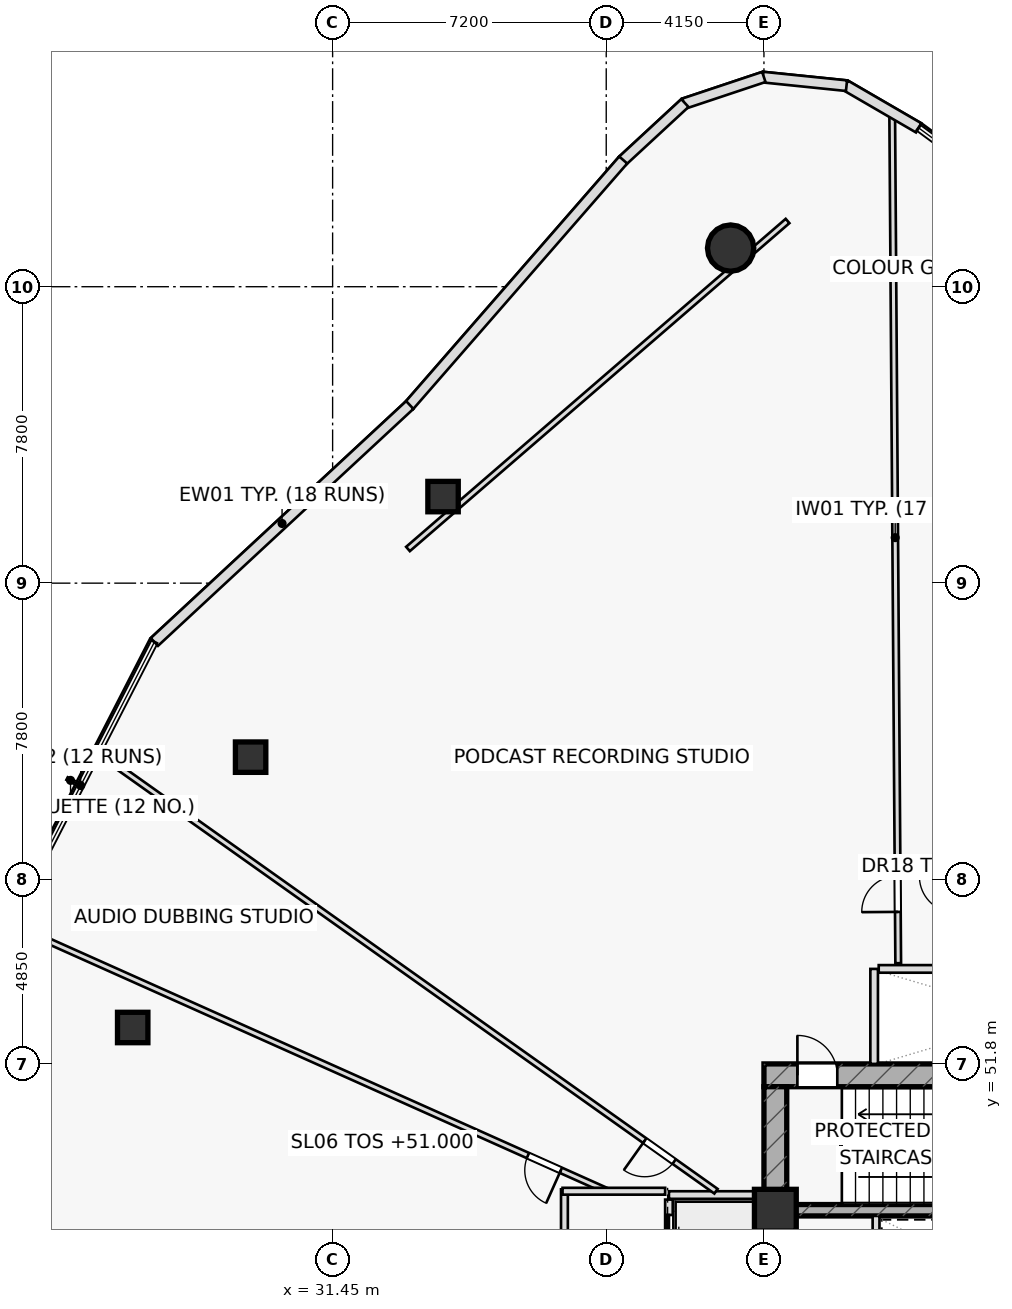
"""IFC4 building model, lengths in metres.
Left out: names, types, materials, properties, quantities, classifications, styles, units other than length and angle.
Written with IfcOpenShell. Run it as: python <this file> out.ifc"""

import sys

from ifc_helpers import new_model, si_unit, direction, frame, frame_2d, origin, origin_2d, place, context, subcontext, project, spatial, rectangle, hollow_rectangle, hollow_circle, extrude, element, fill, save


model = new_model("IFC4")
c1 = context("Model", 3, precision=1e-05, world=origin(), true_north=direction((0.0, 1.0)))
c2 = subcontext(c1, "Body", "Model", "MODEL_VIEW")
j1 = project(units=[si_unit("LENGTHUNIT", "METRE"), si_unit("PLANEANGLEUNIT", "RADIAN")], contexts=[c1])
p1 = place(None, origin())
s1 = spatial("IfcSite", under=j1, at=p1, CompositionType="ELEMENT")
p2 = place(p1, origin())
s2 = spatial("IfcBuilding", under=s1, at=p2, CompositionType="ELEMENT")
p3 = place(p2, frame((0.0, 0.0, 51.0)))
s3 = spatial("IfcBuildingStorey", under=s2, at=p3, CompositionType="ELEMENT", Elevation=51.0)
p4 = place(p3, frame((42.8, 51.5, 0.0), z_axis=(0.0, 0.0, 1.0), x_axis=(1.0, 0.0, 0.0)))
e1 = element("IfcWall", 1, at=p4, inside=s3, PredefinedType="SHEAR", context=c2, shape_type="SweptSolid", body=[
    extrude(rectangle(XDim=14.4, YDim=0.6, at=frame_2d((7.2, 0.0))), origin(), (0.0, 0.0, 1.0), 3.6),
])
p5 = place(p4, frame((0.88, 0.0, 0.0)))
e2 = element("IfcOpeningElement", 2, at=p5, cuts=e1, PredefinedType="OPENING", context=c2, shape_type="SweptSolid", body=[
    extrude(rectangle(XDim=1.05, YDim=2.2, at=frame_2d((0.525, 1.1))), frame((0.0, 0.31, 0.0), z_axis=(0.0, -1.0, 0.0), x_axis=(1.0, 0.0, 0.0)), (0.0, 0.0, 1.0), 0.62),
])
p6 = place(p3, frame((43.1, 38.8, 0.0), z_axis=(0.0, 0.0, 1.0), x_axis=(0.0, 1.0, 0.0)))
e3 = element("IfcWall", 3, at=p6, inside=s3, PredefinedType="SHEAR", context=c2, shape_type="SweptSolid", body=[
    extrude(rectangle(XDim=12.4, YDim=0.6, at=frame_2d((6.2, 0.0))), origin(), (0.0, 0.0, 1.0), 3.6),
])
p7 = place(p3, frame((43.4, 47.95, 0.0), z_axis=(0.0, 0.0, 1.0), x_axis=(1.0, 0.0, 0.0)))
e4 = element("IfcWall", 4, at=p7, inside=s3, PredefinedType="SHEAR", context=c2, shape_type="SweptSolid", body=[
    extrude(rectangle(XDim=13.2, YDim=0.3, at=frame_2d((6.6, 0.0))), origin(), (0.0, 0.0, 1.0), 3.6),
])
p8 = place(p7, frame((8.345, 0.0, 0.0)))
e5 = element("IfcOpeningElement", 5, at=p8, cuts=e4, PredefinedType="OPENING", context=c2, shape_type="SweptSolid", body=[
    extrude(rectangle(XDim=1.15, YDim=2.2, at=frame_2d((0.575, 1.1))), frame((0.0, 0.16, 0.0), z_axis=(0.0, -1.0, 0.0), x_axis=(1.0, 0.0, 0.0)), (0.0, 0.0, 1.0), 0.32),
])
p9 = place(p7, frame((10.065, 0.0, 0.0)))
e6 = element("IfcOpeningElement", 6, at=p9, cuts=e4, PredefinedType="OPENING", context=c2, shape_type="SweptSolid", body=[
    extrude(rectangle(XDim=1.15, YDim=2.2, at=frame_2d((0.575, 1.1))), frame((0.0, 0.16, 0.0), z_axis=(0.0, -1.0, 0.0), x_axis=(1.0, 0.0, 0.0)), (0.0, 0.0, 1.0), 0.32),
])
p10 = place(p7, frame((11.645, 0.0, 0.0)))
e7 = element("IfcOpeningElement", 7, at=p10, cuts=e4, PredefinedType="OPENING", context=c2, shape_type="SweptSolid", body=[
    extrude(rectangle(XDim=1.15, YDim=2.2, at=frame_2d((0.575, 1.1))), frame((0.0, 0.16, 0.0), z_axis=(0.0, -1.0, 0.0), x_axis=(1.0, 0.0, 0.0)), (0.0, 0.0, 1.0), 0.32),
])
p11 = place(p3, frame((43.1, 47.95, 0.0), z_axis=(0.0, 0.0, 1.0), x_axis=(1.0, 0.0, 0.0)))
e8 = element("IfcColumn", 8, at=p11, inside=s3, PredefinedType="COLUMN", context=c2, shape_type="SweptSolid", body=[
    extrude(rectangle(XDim=1.1, YDim=1.1, at=origin_2d()), origin(), (0.0, 0.0, 1.0), 3.6),
])
p12 = place(p3, frame((41.923, 73.266, 0.0), z_axis=(0.0, 0.0, 1.0), x_axis=(1.0, 0.0, 0.0)))
e9 = element("IfcColumn", 9, at=p12, inside=s3, PredefinedType="COLUMN", context=c2, shape_type="SweptSolid", body=[
    extrude(hollow_circle(Radius=0.61, WallThickness=0.05, at=origin_2d()), origin(), (0.0, 0.0, 1.0), 3.6),
])
for number, where, z_axis, x_axis in (
    (10, (34.356, 66.728, 0.0), (0.0, 0.0, 1.0), (1.0, 0.0, 0.0)),
    (11, (29.292, 59.872, 0.0), (0.0, 0.0, 1.0), (1.0, 0.0, 0.0)),
    (12, (26.189, 52.758, 0.0), (0.0, 0.0, 1.0), (1.0, 0.0, 0.0)),
):
    element("IfcColumn", number, at=place(p3, frame(where, z_axis=z_axis, x_axis=x_axis)), inside=s3, PredefinedType="COLUMN", context=c2, shape_type="SweptSolid", body=[
        extrude(hollow_rectangle(XDim=0.8, YDim=0.8, WallThickness=0.045, at=origin_2d()), origin(), (0.0, 0.0, 1.0), 3.6),
    ])
for number, where, z_axis, x_axis in (
    (13, (40.3, 48.35, 0.0), (0.0, 0.0, 1.0), (1.0, 0.0, 0.0)),
    (14, (45.7, 51.8, 0.0), (0.0, 0.0, 1.0), (0.0, 1.0, 0.0)),
):
    element("IfcWall", number, at=place(p3, frame(where, z_axis=z_axis, x_axis=x_axis)), inside=s3, PredefinedType="PARTITIONING", context=c2, shape_type="SweptSolid", body=[
        extrude(rectangle(XDim=2.5, YDim=0.2, at=frame_2d((1.25, 0.0))), origin(), (0.0, 0.0, 1.0), 3.6),
    ])
p13 = place(p3, frame((45.75, 42.2, 0.0), z_axis=(0.0, 0.0, 1.0), x_axis=(0.0, 1.0, 0.0)))
e15 = element("IfcWall", 15, at=p13, inside=s3, PredefinedType="PARTITIONING", context=c2, shape_type="SweptSolid", body=[
    extrude(rectangle(XDim=5.6, YDim=0.18, at=frame_2d((2.8, 0.0))), origin(), (0.0, 0.0, 1.0), 3.6),
])
p14 = place(p13, frame((0.55, 0.0, 0.0)))
e16 = element("IfcOpeningElement", 16, at=p14, cuts=e15, PredefinedType="OPENING", context=c2, shape_type="SweptSolid", body=[
    extrude(rectangle(XDim=0.9, YDim=2.05, at=frame_2d((0.45, 1.025))), frame((0.0, 0.1, 0.0), z_axis=(0.0, -1.0, 0.0), x_axis=(1.0, 0.0, 0.0)), (0.0, 0.0, 1.0), 0.2),
])
p15 = place(p13, frame((2.9, 0.0, 0.0)))
e17 = element("IfcOpeningElement", 17, at=p15, cuts=e15, PredefinedType="OPENING", context=c2, shape_type="SweptSolid", body=[
    extrude(rectangle(XDim=0.85, YDim=2.05, at=frame_2d((0.425, 1.025))), frame((0.0, 0.1, 0.0), z_axis=(0.0, -1.0, 0.0), x_axis=(1.0, 0.0, 0.0)), (0.0, 0.0, 1.0), 0.2),
])
p16 = place(p3, frame((43.421, 73.979, 0.0), z_axis=(0.0, 0.0, 1.0), x_axis=(-0.756659135409, -0.653809569218, 0.0)))
e18 = element("IfcWall", 18, at=p16, inside=s3, PredefinedType="PARTITIONING", context=c2, shape_type="SweptSolid", body=[
    extrude(rectangle(XDim=13.2, YDim=0.15, at=frame_2d((6.6, 0.0))), origin(), (0.0, 0.0, 1.0), 2.925),
])
p17 = place(p3, frame((46.333, 54.45, 0.0), z_axis=(0.0, 0.0, 1.0), x_axis=(-0.007063802918, 0.999975051033, 0.0)))
e19 = element("IfcWall", 19, at=p17, inside=s3, PredefinedType="PARTITIONING", context=c2, shape_type="SweptSolid", body=[
    extrude(rectangle(XDim=22.396, YDim=0.15, at=frame_2d((11.198, 0.0))), origin(), (0.0, 0.0, 1.0), 2.975),
])
p18 = place(p17, frame((1.35, 0.0, 0.0)))
e20 = element("IfcOpeningElement", 20, at=p18, cuts=e19, PredefinedType="OPENING", context=c2, shape_type="SweptSolid", body=[
    extrude(rectangle(XDim=0.95, YDim=2.05, at=frame_2d((0.475, 1.025))), frame((0.0, 0.085, 0.0), z_axis=(0.0, -1.0, 0.0), x_axis=(1.0, 0.0, 0.0)), (0.0, 0.0, 1.0), 0.17),
])
p19 = place(p3, frame((41.539, 48.45, 0.0), z_axis=(0.0, 0.0, 1.0), x_axis=(-0.81551552438, 0.578735198079, 0.0)))
e21 = element("IfcWall", 21, at=p19, inside=s3, PredefinedType="PARTITIONING", context=c2, shape_type="SweptSolid", body=[
    extrude(rectangle(XDim=19.961, YDim=0.15, at=frame_2d((9.98, 0.0))), origin(), (0.0, 0.0, 1.0), 2.925),
])
p20 = place(p19, frame((1.35, 0.0, 0.0)))
e22 = element("IfcOpeningElement", 22, at=p20, cuts=e21, PredefinedType="OPENING", context=c2, shape_type="SweptSolid", body=[
    extrude(rectangle(XDim=0.95, YDim=2.05, at=frame_2d((0.475, 1.025))), frame((0.0, 0.085, 0.0), z_axis=(0.0, -1.0, 0.0), x_axis=(1.0, 0.0, 0.0)), (0.0, 0.0, 1.0), 0.17),
])
p21 = place(p3, frame((38.688, 48.45, 0.0), z_axis=(0.0, 0.0, 1.0), x_axis=(-0.912816446659, 0.408370095269, 0.0)))
e23 = element("IfcWall", 23, at=p21, inside=s3, PredefinedType="PARTITIONING", context=c2, shape_type="SweptSolid", body=[
    extrude(rectangle(XDim=17.247, YDim=0.15, at=frame_2d((8.623, 0.0))), origin(), (0.0, 0.0, 1.0), 2.925),
])
p22 = place(p21, frame((1.35, 0.0, 0.0)))
e24 = element("IfcOpeningElement", 24, at=p22, cuts=e23, PredefinedType="OPENING", context=c2, shape_type="SweptSolid", body=[
    extrude(rectangle(XDim=0.95, YDim=2.05, at=frame_2d((0.475, 1.025))), frame((0.0, 0.085, 0.0), z_axis=(0.0, -1.0, 0.0), x_axis=(1.0, 0.0, 0.0)), (0.0, 0.0, 1.0), 0.17),
])
p23 = place(p3, frame((37.55, 35.75, 0.0), z_axis=(0.0, 0.0, 1.0), x_axis=(0.0, 1.0, 0.0)))
e25 = element("IfcWall", 25, at=p23, inside=s3, PredefinedType="PARTITIONING", context=c2, shape_type="SweptSolid", body=[
    extrude(rectangle(XDim=12.75, YDim=0.18, at=frame_2d((6.375, 0.0))), origin(), (0.0, 0.0, 1.0), 2.925),
])
p24 = place(p23, frame((2.4, 0.0, 0.0)))
e26 = element("IfcOpeningElement", 26, at=p24, cuts=e25, PredefinedType="OPENING", context=c2, shape_type="SweptSolid", body=[
    extrude(rectangle(XDim=0.95, YDim=2.05, at=frame_2d((0.475, 1.025))), frame((0.0, 0.1, 0.0), z_axis=(0.0, -1.0, 0.0), x_axis=(1.0, 0.0, 0.0)), (0.0, 0.0, 1.0), 0.2),
])
p25 = place(p23, frame((8.547, 0.0, 0.0)))
e27 = element("IfcOpeningElement", 27, at=p25, cuts=e25, PredefinedType="OPENING", context=c2, shape_type="SweptSolid", body=[
    extrude(rectangle(XDim=0.95, YDim=2.05, at=frame_2d((0.475, 1.025))), frame((0.0, 0.1, 0.0), z_axis=(0.0, -1.0, 0.0), x_axis=(1.0, 0.0, 0.0)), (0.0, 0.0, 1.0), 0.2),
])
p26 = place(p3, frame((37.5, 48.45, 0.0), z_axis=(0.0, 0.0, 1.0), x_axis=(1.0, 0.0, 0.0)))
e28 = element("IfcWall", 28, at=p26, inside=s3, PredefinedType="PARTITIONING", context=c2, shape_type="SweptSolid", body=[
    extrude(rectangle(XDim=2.7, YDim=0.18, at=frame_2d((1.35, 0.0))), origin(), (0.0, 0.0, 1.0), 3.6),
])
p27 = place(p3, frame((46.871, 76.43, 0.0), z_axis=(0.0, 0.0, 1.0), x_axis=(-0.86470757028, 0.502275639366, 0.0)))
e29 = element("IfcWall", 29, at=p27, inside=s3, PredefinedType="STANDARD", context=c2, shape_type="SweptSolid", body=[
    extrude(rectangle(XDim=2.228, YDim=0.28, at=frame_2d((1.114, 0.0))), origin(), (0.0, 0.0, 1.0), 3.6),
])
p28 = place(p3, frame((44.972, 77.54, 0.0), z_axis=(0.0, 0.0, 1.0), x_axis=(-0.994794332276, 0.101903073904, 0.0)))
e30 = element("IfcWall", 30, at=p28, inside=s3, PredefinedType="STANDARD", context=c2, shape_type="SweptSolid", body=[
    extrude(rectangle(XDim=2.216, YDim=0.28, at=frame_2d((1.108, 0.0))), origin(), (0.0, 0.0, 1.0), 3.6),
])
p29 = place(p3, frame((42.797, 77.769, 0.0), z_axis=(0.0, 0.0, 1.0), x_axis=(-0.948595132525, -0.316492139791, 0.0)))
e31 = element("IfcWall", 31, at=p29, inside=s3, PredefinedType="STANDARD", context=c2, shape_type="SweptSolid", body=[
    extrude(rectangle(XDim=2.216, YDim=0.28, at=frame_2d((1.108, 0.0))), origin(), (0.0, 0.0, 1.0), 3.6),
])
p30 = place(p3, frame((40.72, 77.082, 0.0), z_axis=(0.0, 0.0, 1.0), x_axis=(-0.734368471989, -0.678751020145, 0.0)))
e32 = element("IfcWall", 32, at=p30, inside=s3, PredefinedType="STANDARD", context=c2, shape_type="SweptSolid", body=[
    extrude(rectangle(XDim=2.239, YDim=0.28, at=frame_2d((1.119, 0.0))), origin(), (0.0, 0.0, 1.0), 3.6),
])
p31 = place(p3, frame((39.097, 75.584, 0.0), z_axis=(0.0, 0.0, 1.0), x_axis=(-0.657063068244, -0.753835608306, 0.0)))
e33 = element("IfcWall", 33, at=p31, inside=s3, PredefinedType="STANDARD", context=c2, shape_type="SweptSolid", body=[
    extrude(rectangle(XDim=8.58, YDim=0.28, at=frame_2d((4.29, 0.0))), origin(), (0.0, 0.0, 1.0), 3.6),
])
p32 = place(p3, frame((33.48, 69.138, 0.0), z_axis=(0.0, 0.0, 1.0), x_axis=(-0.733106400335, -0.680113965294, 0.0)))
e34 = element("IfcWall", 34, at=p32, inside=s3, PredefinedType="STANDARD", context=c2, shape_type="SweptSolid", body=[
    extrude(rectangle(XDim=9.168, YDim=0.28, at=frame_2d((4.584, 0.0))), origin(), (0.0, 0.0, 1.0), 3.6),
])
p33 = place(p3, frame((40.3, 40.02, 0.0), z_axis=(0.0, 0.0, 1.0), x_axis=(0.0, 1.0, 0.0)))
e35 = element("IfcWall", 35, at=p33, inside=s3, PredefinedType="PARTITIONING", context=c2, shape_type="SweptSolid", body=[
    extrude(rectangle(XDim=8.21, YDim=0.2, at=frame_2d((4.105, 0.0))), origin(), (0.0, 0.0, 1.0), 3.6),
])
p34 = place(p33, frame((0.405, 0.0, 0.0)))
e36 = element("IfcOpeningElement", 36, at=p34, cuts=e35, PredefinedType="OPENING", context=c2, shape_type="SweptSolid", body=[
    extrude(rectangle(XDim=1.1, YDim=2.15, at=frame_2d((0.55, 1.075))), frame((0.0, 0.11, 0.0), z_axis=(0.0, -1.0, 0.0), x_axis=(1.0, 0.0, 0.0)), (0.0, 0.0, 1.0), 0.22),
])
p35 = place(p33, frame((2.505, 0.0, 0.0)))
e37 = element("IfcOpeningElement", 37, at=p35, cuts=e35, PredefinedType="OPENING", context=c2, shape_type="SweptSolid", body=[
    extrude(rectangle(XDim=1.1, YDim=2.15, at=frame_2d((0.55, 1.075))), frame((0.0, 0.11, 0.0), z_axis=(0.0, -1.0, 0.0), x_axis=(1.0, 0.0, 0.0)), (0.0, 0.0, 1.0), 0.22),
])
p36 = place(p33, frame((4.605, 0.0, 0.0)))
e38 = element("IfcOpeningElement", 38, at=p36, cuts=e35, PredefinedType="OPENING", context=c2, shape_type="SweptSolid", body=[
    extrude(rectangle(XDim=1.1, YDim=2.15, at=frame_2d((0.55, 1.075))), frame((0.0, 0.11, 0.0), z_axis=(0.0, -1.0, 0.0), x_axis=(1.0, 0.0, 0.0)), (0.0, 0.0, 1.0), 0.22),
])
p37 = place(p33, frame((6.705, 0.0, 0.0)))
e39 = element("IfcOpeningElement", 39, at=p37, cuts=e35, PredefinedType="OPENING", context=c2, shape_type="SweptSolid", body=[
    extrude(rectangle(XDim=1.1, YDim=2.15, at=frame_2d((0.55, 1.075))), frame((0.0, 0.11, 0.0), z_axis=(0.0, -1.0, 0.0), x_axis=(1.0, 0.0, 0.0)), (0.0, 0.0, 1.0), 0.22),
])
p38 = place(p3, frame((45.82, 54.3, 0.0), z_axis=(0.0, 0.0, 1.0), x_axis=(1.0, 0.0, 0.0)))
e40 = element("IfcWall", 40, at=p38, inside=s3, PredefinedType="PARTITIONING", context=c2, shape_type="SweptSolid", body=[
    extrude(rectangle(XDim=8.31, YDim=0.2, at=frame_2d((4.155, 0.0))), origin(), (0.0, 0.0, 1.0), 3.6),
])
p39 = place(p5, origin())
e41 = element("IfcDoor", 41, at=p39, inside=s3, OperationType="SINGLE_SWING_LEFT", PredefinedType="DOOR", context=c2, shape_type="SweptSolid", body=[
    extrude(rectangle(XDim=1.05, YDim=2.2, at=frame_2d((0.525, 1.1))), frame((0.0, 0.025, 0.0), z_axis=(0.0, -1.0, 0.0), x_axis=(1.0, 0.0, 0.0)), (0.0, 0.0, 1.0), 0.05),
])
fill(e2, e41)
p40 = place(p18, origin())
e42 = element("IfcDoor", 42, at=p40, inside=s3, OperationType="SINGLE_SWING_LEFT", PredefinedType="DOOR", context=c2, shape_type="SweptSolid", body=[
    extrude(rectangle(XDim=0.95, YDim=2.05, at=frame_2d((0.475, 1.025))), frame((0.0, 0.025, 0.0), z_axis=(0.0, -1.0, 0.0), x_axis=(1.0, 0.0, 0.0)), (0.0, 0.0, 1.0), 0.05),
])
fill(e20, e42)
p41 = place(p20, origin())
e43 = element("IfcDoor", 43, at=p41, inside=s3, OperationType="SINGLE_SWING_RIGHT", PredefinedType="DOOR", context=c2, shape_type="SweptSolid", body=[
    extrude(rectangle(XDim=0.95, YDim=2.05, at=frame_2d((0.475, 1.025))), frame((0.0, 0.025, 0.0), z_axis=(0.0, -1.0, 0.0), x_axis=(1.0, 0.0, 0.0)), (0.0, 0.0, 1.0), 0.05),
])
fill(e22, e43)
p42 = place(p22, origin())
e44 = element("IfcDoor", 44, at=p42, inside=s3, OperationType="SINGLE_SWING_LEFT", PredefinedType="DOOR", context=c2, shape_type="SweptSolid", body=[
    extrude(rectangle(XDim=0.95, YDim=2.05, at=frame_2d((0.475, 1.025))), frame((0.0, 0.025, 0.0), z_axis=(0.0, -1.0, 0.0), x_axis=(1.0, 0.0, 0.0)), (0.0, 0.0, 1.0), 0.05),
])
fill(e24, e44)
p43 = place(p37, origin())
e45 = element("IfcDoor", 45, at=p43, inside=s3, OperationType="SLIDING_TO_RIGHT", PredefinedType="DOOR", context=c2, shape_type="SweptSolid", body=[
    extrude(rectangle(XDim=1.1, YDim=2.15, at=frame_2d((0.55, 1.075))), frame((0.0, 0.025, 0.0), z_axis=(0.0, -1.0, 0.0), x_axis=(1.0, 0.0, 0.0)), (0.0, 0.0, 1.0), 0.05),
])
fill(e39, e45)
save(model, sys.argv[1])
